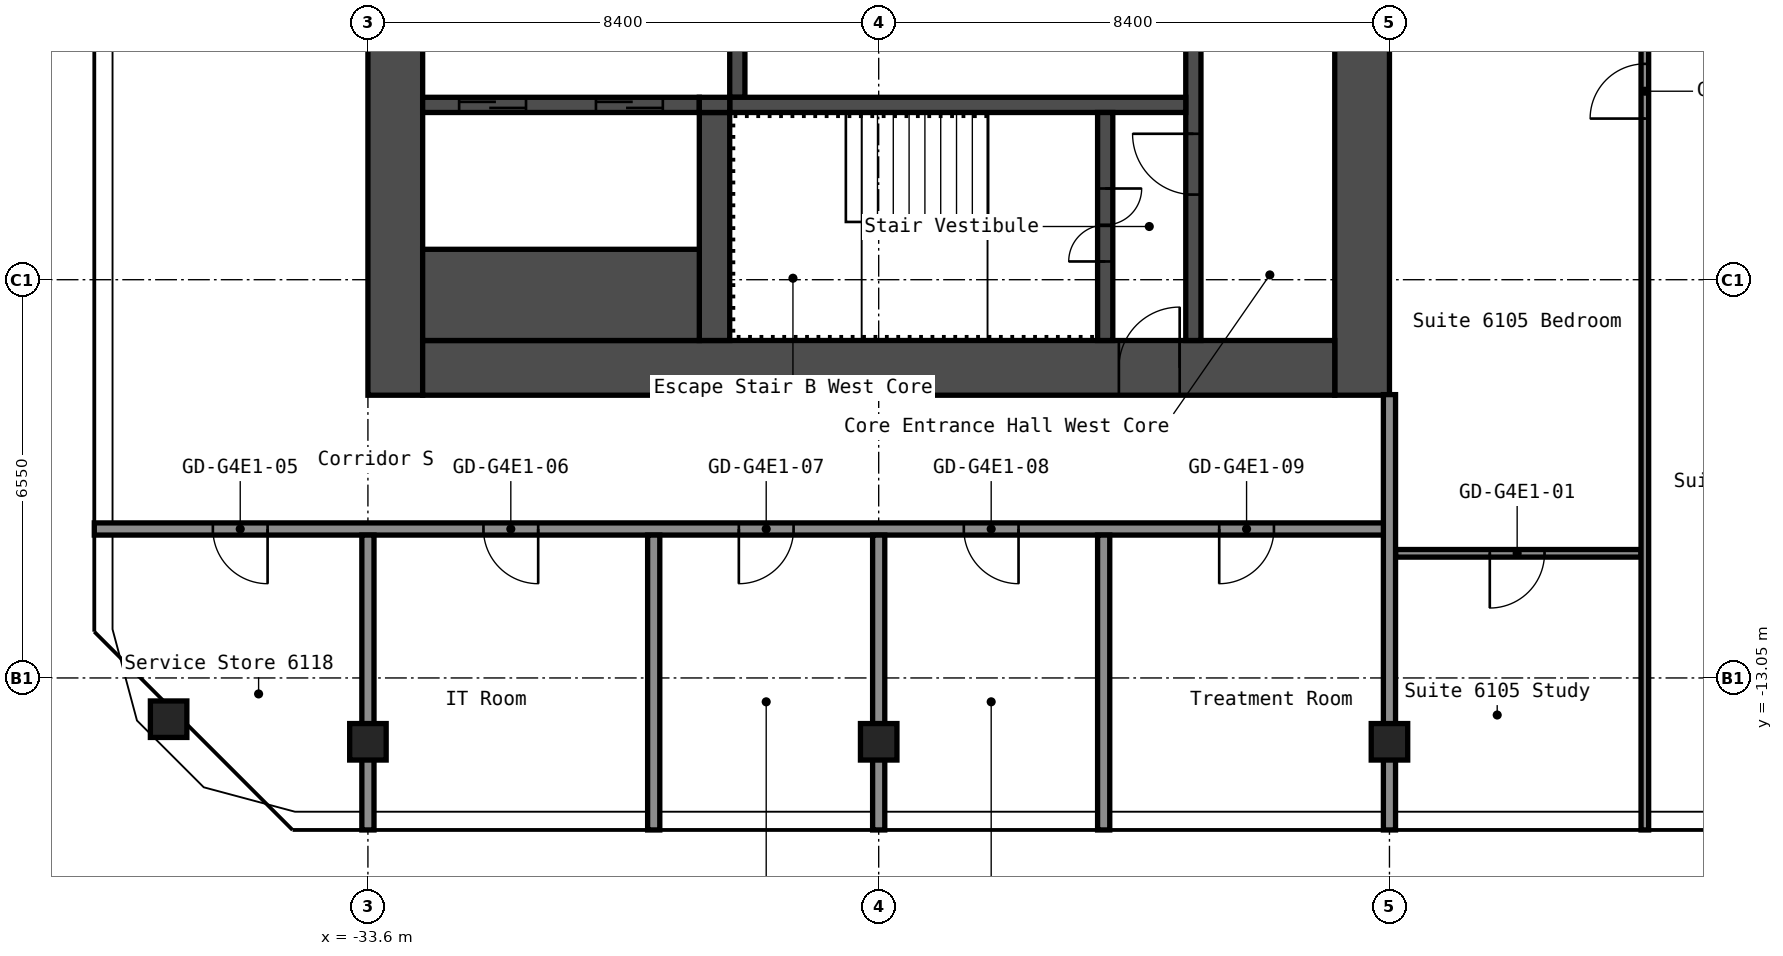
"""IFC4 building model, lengths in metres.
Left out: names, types, materials, properties, quantities, classifications, styles, units other than length and angle.
Written with IfcOpenShell. Run it as: python <this file> out.ifc"""

import sys

from ifc_helpers import new_model, si_unit, direction, frame, frame_2d, origin, origin_2d, place, context, subcontext, project, spatial, rectangle, hollow_rectangle, extrude, element, fill, save


model = new_model("IFC4")
c1 = context("Model", 3, precision=1e-05, world=origin(), true_north=direction((0.0, 1.0)))
c2 = subcontext(c1, "Body", "Model", "MODEL_VIEW")
j1 = project(units=[si_unit("LENGTHUNIT", "METRE"), si_unit("PLANEANGLEUNIT", "RADIAN")], contexts=[c1])
p1 = place(None, origin())
s1 = spatial("IfcSite", under=j1, at=p1, CompositionType="ELEMENT")
p2 = place(p1, origin())
s2 = spatial("IfcBuilding", under=s1, at=p2, CompositionType="ELEMENT")
p3 = place(p2, frame((0.0, 0.0, 215.4)))
s3 = spatial("IfcBuildingStorey", under=s2, at=p3, CompositionType="ELEMENT", Elevation=215.4)
for number, where, z_axis, x_axis in (
    (1, (-36.878, -13.729, 0.0), (0.0, 0.0, 1.0), (1.0, 0.0, 0.0)),
    (2, (-33.6, -14.1, 0.0), (0.0, 0.0, 1.0), (1.0, 0.0, 0.0)),
    (3, (-25.2, -14.1, 0.0), (0.0, 0.0, 1.0), (1.0, 0.0, 0.0)),
    (4, (-16.8, -14.1, 0.0), (0.0, 0.0, 1.0), (1.0, 0.0, 0.0)),
):
    element("IfcColumn", number, at=place(p3, frame(where, z_axis=z_axis, x_axis=x_axis)), inside=s3, PredefinedType="COLUMN", context=c2, shape_type="SweptSolid", body=[
        extrude(hollow_rectangle(XDim=0.6, YDim=0.6, WallThickness=0.025, InnerFilletRadius=0.038, OuterFilletRadius=0.062, at=origin_2d()), origin(), (0.0, 0.0, 1.0), 2.75),
    ])
p4 = place(p3, frame((-17.25, -8.4, 0.0), z_axis=(0.0, 0.0, 1.0), x_axis=(0.0, 1.0, 0.0)))
e5 = element("IfcWall", 5, at=p4, inside=s3, PredefinedType="SHEAR", context=c2, shape_type="SweptSolid", body=[
    extrude(rectangle(XDim=16.8, YDim=0.9, at=frame_2d((8.4, 0.0))), origin(), (0.0, 0.0, 1.0), 2.75),
])
p5 = place(p4, frame((10.1, 0.0, 0.0)))
e6 = element("IfcOpeningElement", 6, at=p5, cuts=e5, PredefinedType="OPENING", context=c2, shape_type="SweptSolid", body=[
    extrude(rectangle(XDim=1.6, YDim=2.1, at=frame_2d((0.8, 1.05))), frame((0.0, 0.46, 0.0), z_axis=(0.0, -1.0, 0.0), x_axis=(1.0, 0.0, 0.0)), (0.0, 0.0, 1.0), 0.92),
])
p6 = place(p3, frame((-33.15, -8.4, 0.0), z_axis=(0.0, 0.0, 1.0), x_axis=(0.0, 1.0, 0.0)))
e7 = element("IfcWall", 7, at=p6, inside=s3, PredefinedType="SHEAR", context=c2, shape_type="SweptSolid", body=[
    extrude(rectangle(XDim=16.8, YDim=0.9, at=frame_2d((8.4, 0.0))), origin(), (0.0, 0.0, 1.0), 2.75),
])
p7 = place(p3, frame((-32.7, -7.95, 0.0), z_axis=(0.0, 0.0, 1.0), x_axis=(1.0, 0.0, 0.0)))
e8 = element("IfcWall", 8, at=p7, inside=s3, PredefinedType="SHEAR", context=c2, shape_type="SweptSolid", body=[
    extrude(rectangle(XDim=15.0, YDim=0.9, at=frame_2d((7.5, 0.0))), origin(), (0.0, 0.0, 1.0), 2.75),
])
p8 = place(p7, frame((11.45, 0.0, 0.0)))
e9 = element("IfcOpeningElement", 9, at=p8, cuts=e8, PredefinedType="OPENING", context=c2, shape_type="SweptSolid", body=[
    extrude(rectangle(XDim=1.0, YDim=2.1, at=frame_2d((0.5, 1.05))), frame((0.0, 0.46, 0.0), z_axis=(0.0, -1.0, 0.0), x_axis=(1.0, 0.0, 0.0)), (0.0, 0.0, 1.0), 0.92),
])
p9 = place(p3, frame((-20.025, -7.5, 0.0), z_axis=(0.0, 0.0, 1.0), x_axis=(0.0, 1.0, 0.0)))
e10 = element("IfcWall", 10, at=p9, inside=s3, PredefinedType="SHEAR", context=c2, shape_type="SweptSolid", body=[
    extrude(rectangle(XDim=6.3, YDim=0.25, at=frame_2d((3.15, 0.0))), origin(), (0.0, 0.0, 1.0), 2.75),
])
p10 = place(p9, frame((2.4, 0.0, 0.0)))
e11 = element("IfcOpeningElement", 11, at=p10, cuts=e10, PredefinedType="OPENING", context=c2, shape_type="SweptSolid", body=[
    extrude(rectangle(XDim=1.0, YDim=2.1, at=frame_2d((0.5, 1.05))), frame((0.0, 0.135, 0.0), z_axis=(0.0, -1.0, 0.0), x_axis=(1.0, 0.0, 0.0)), (0.0, 0.0, 1.0), 0.27),
])
p11 = place(p3, frame((-27.525, -3.5, 0.0), z_axis=(0.0, 0.0, 1.0), x_axis=(0.0, 1.0, 0.0)))
e12 = element("IfcWall", 12, at=p11, inside=s3, PredefinedType="SHEAR", context=c2, shape_type="SweptSolid", body=[
    extrude(rectangle(XDim=2.05, YDim=0.25, at=frame_2d((1.025, 0.0))), origin(), (0.0, 0.0, 1.0), 2.75),
])
p12 = place(p3, frame((-27.65, -3.625, 0.0), z_axis=(0.0, 0.0, 1.0), x_axis=(1.0, 0.0, 0.0)))
e13 = element("IfcWall", 13, at=p12, inside=s3, PredefinedType="SHEAR", context=c2, shape_type="SweptSolid", body=[
    extrude(rectangle(XDim=7.5, YDim=0.25, at=frame_2d((3.75, 0.0))), origin(), (0.0, 0.0, 1.0), 2.75),
])
p13 = place(p3, frame((-21.475, -7.5, 0.0), z_axis=(0.0, 0.0, 1.0), x_axis=(0.0, 1.0, 0.0)))
e14 = element("IfcWall", 14, at=p13, inside=s3, PredefinedType="SHEAR", context=c2, shape_type="SweptSolid", body=[
    extrude(rectangle(XDim=3.75, YDim=0.25, at=frame_2d((1.875, 0.0))), origin(), (0.0, 0.0, 1.0), 2.75),
])
p14 = place(p13, frame((1.3, 0.0, 0.0)))
e15 = element("IfcOpeningElement", 15, at=p14, cuts=e14, PredefinedType="OPENING", context=c2, shape_type="SweptSolid", body=[
    extrude(rectangle(XDim=1.2, YDim=2.1, at=frame_2d((0.6, 1.05))), frame((0.0, 0.135, 0.0), z_axis=(0.0, -1.0, 0.0), x_axis=(1.0, 0.0, 0.0)), (0.0, 0.0, 1.0), 0.27),
])
p15 = place(p3, frame((-27.9, -7.5, 0.0), z_axis=(0.0, 0.0, 1.0), x_axis=(0.0, 1.0, 0.0)))
e16 = element("IfcWall", 16, at=p15, inside=s3, PredefinedType="SHEAR", context=c2, shape_type="SweptSolid", body=[
    extrude(rectangle(XDim=3.75, YDim=0.5, at=frame_2d((1.875, 0.0))), origin(), (0.0, 0.0, 1.0), 2.75),
])
p16 = place(p3, frame((-32.7, -3.625, 0.0), z_axis=(0.0, 0.0, 1.0), x_axis=(1.0, 0.0, 0.0)))
e17 = element("IfcWall", 17, at=p16, inside=s3, PredefinedType="SHEAR", context=c2, shape_type="SweptSolid", body=[
    extrude(rectangle(XDim=4.55, YDim=0.25, at=frame_2d((2.275, 0.0))), origin(), (0.0, 0.0, 1.0), 2.75),
])
p17 = place(p16, frame((2.85, 0.0, 0.0)))
e18 = element("IfcOpeningElement", 18, at=p17, cuts=e17, PredefinedType="OPENING", context=c2, shape_type="SweptSolid", body=[
    extrude(rectangle(XDim=1.1, YDim=2.1, at=frame_2d((0.55, 1.05))), frame((0.0, 0.135, 0.0), z_axis=(0.0, -1.0, 0.0), x_axis=(1.0, 0.0, 0.0)), (0.0, 0.0, 1.0), 0.27),
])
p18 = place(p16, frame((0.6, 0.0, 0.0)))
e19 = element("IfcOpeningElement", 19, at=p18, cuts=e17, PredefinedType="OPENING", context=c2, shape_type="SweptSolid", body=[
    extrude(rectangle(XDim=1.1, YDim=2.1, at=frame_2d((0.55, 1.05))), frame((0.0, 0.135, 0.0), z_axis=(0.0, -1.0, 0.0), x_axis=(1.0, 0.0, 0.0)), (0.0, 0.0, 1.0), 0.27),
])
p19 = place(p3, frame((-32.7, -6.75, 0.0), z_axis=(0.0, 0.0, 1.0), x_axis=(1.0, 0.0, 0.0)))
e20 = element("IfcWall", 20, at=p19, inside=s3, PredefinedType="SHEAR", context=c2, shape_type="SweptSolid", body=[
    extrude(rectangle(XDim=4.55, YDim=1.5, at=frame_2d((2.275, 0.0))), origin(), (0.0, 0.0, 1.0), 2.75),
])
p20 = place(p3, frame((-28.15, -3.625, 0.0), z_axis=(0.0, 0.0, 1.0), x_axis=(1.0, 0.0, 0.0)))
e21 = element("IfcWall", 21, at=p20, inside=s3, PredefinedType="SHEAR", context=c2, shape_type="SweptSolid", body=[
    extrude(rectangle(XDim=0.5, YDim=0.25, at=frame_2d((0.25, 0.0))), origin(), (0.0, 0.0, 1.0), 2.75),
])
p21 = place(p3, frame((-16.7, -11.0, 0.0), z_axis=(0.0, 0.0, 1.0), x_axis=(1.0, 0.0, 0.0)))
e22 = element("IfcWall", 22, at=p21, inside=s3, PredefinedType="PARTITIONING", context=c2, shape_type="SweptSolid", body=[
    extrude(rectangle(XDim=4.037, YDim=0.125, at=frame_2d((2.019, 0.0))), origin(), (0.0, 0.0, 1.0), 2.75),
])
p22 = place(p21, frame((1.55, 0.0, 0.0)))
e23 = element("IfcOpeningElement", 23, at=p22, cuts=e22, PredefinedType="OPENING", context=c2, shape_type="SweptSolid", body=[
    extrude(rectangle(XDim=0.9, YDim=2.1, at=frame_2d((0.45, 1.05))), frame((0.0, 0.073, 0.0), z_axis=(0.0, -1.0, 0.0), x_axis=(1.0, 0.0, 0.0)), (0.0, 0.0, 1.0), 0.145),
])
p23 = place(p3, frame((-38.1, -10.6, 0.0), z_axis=(0.0, 0.0, 1.0), x_axis=(1.0, 0.0, 0.0)))
e24 = element("IfcWall", 24, at=p23, inside=s3, PredefinedType="PARTITIONING", context=c2, shape_type="SweptSolid", body=[
    extrude(rectangle(XDim=21.3, YDim=0.2, at=frame_2d((10.65, 0.0))), origin(), (0.0, 0.0, 1.0), 2.75),
])
p24 = place(p23, frame((1.95, 0.0, 0.0)))
e25 = element("IfcOpeningElement", 25, at=p24, cuts=e24, PredefinedType="OPENING", context=c2, shape_type="SweptSolid", body=[
    extrude(rectangle(XDim=0.9, YDim=2.1, at=frame_2d((0.45, 1.05))), frame((0.0, 0.11, 0.0), z_axis=(0.0, -1.0, 0.0), x_axis=(1.0, 0.0, 0.0)), (0.0, 0.0, 1.0), 0.22),
])
p25 = place(p23, frame((6.4, 0.0, 0.0)))
e26 = element("IfcOpeningElement", 26, at=p25, cuts=e24, PredefinedType="OPENING", context=c2, shape_type="SweptSolid", body=[
    extrude(rectangle(XDim=0.9, YDim=2.1, at=frame_2d((0.45, 1.05))), frame((0.0, 0.11, 0.0), z_axis=(0.0, -1.0, 0.0), x_axis=(1.0, 0.0, 0.0)), (0.0, 0.0, 1.0), 0.22),
])
p26 = place(p23, frame((10.6, 0.0, 0.0)))
e27 = element("IfcOpeningElement", 27, at=p26, cuts=e24, PredefinedType="OPENING", context=c2, shape_type="SweptSolid", body=[
    extrude(rectangle(XDim=0.9, YDim=2.1, at=frame_2d((0.45, 1.05))), frame((0.0, 0.11, 0.0), z_axis=(0.0, -1.0, 0.0), x_axis=(1.0, 0.0, 0.0)), (0.0, 0.0, 1.0), 0.22),
])
p27 = place(p23, frame((14.3, 0.0, 0.0)))
e28 = element("IfcOpeningElement", 28, at=p27, cuts=e24, PredefinedType="OPENING", context=c2, shape_type="SweptSolid", body=[
    extrude(rectangle(XDim=0.9, YDim=2.1, at=frame_2d((0.45, 1.05))), frame((0.0, 0.11, 0.0), z_axis=(0.0, -1.0, 0.0), x_axis=(1.0, 0.0, 0.0)), (0.0, 0.0, 1.0), 0.22),
])
p28 = place(p23, frame((18.5, 0.0, 0.0)))
e29 = element("IfcOpeningElement", 29, at=p28, cuts=e24, PredefinedType="OPENING", context=c2, shape_type="SweptSolid", body=[
    extrude(rectangle(XDim=0.9, YDim=2.1, at=frame_2d((0.45, 1.05))), frame((0.0, 0.11, 0.0), z_axis=(0.0, -1.0, 0.0), x_axis=(1.0, 0.0, 0.0)), (0.0, 0.0, 1.0), 0.22),
])
for number, where, z_axis, x_axis in (
    (30, (-33.6, -15.55, 0.0), (0.0, 0.0, 1.0), (0.0, 1.0, 0.0)),
    (31, (-28.9, -15.55, 0.0), (0.0, 0.0, 1.0), (0.0, 1.0, 0.0)),
    (32, (-25.2, -15.55, 0.0), (0.0, 0.0, 1.0), (0.0, 1.0, 0.0)),
    (33, (-21.5, -15.55, 0.0), (0.0, 0.0, 1.0), (0.0, 1.0, 0.0)),
):
    element("IfcWall", number, at=place(p3, frame(where, z_axis=z_axis, x_axis=x_axis)), inside=s3, PredefinedType="PARTITIONING", context=c2, shape_type="SweptSolid", body=[
        extrude(rectangle(XDim=4.85, YDim=0.2, at=frame_2d((2.425, 0.0))), origin(), (0.0, 0.0, 1.0), 2.75),
    ])
p29 = place(p3, frame((-16.8, -15.55, 0.0), z_axis=(0.0, 0.0, 1.0), x_axis=(0.0, 1.0, 0.0)))
e34 = element("IfcWall", 34, at=p29, inside=s3, PredefinedType="PARTITIONING", context=c2, shape_type="SweptSolid", body=[
    extrude(rectangle(XDim=7.16, YDim=0.2, at=frame_2d((3.58, 0.0))), origin(), (0.0, 0.0, 1.0), 2.75),
])
p30 = place(p3, frame((-12.6, -15.55, 0.0), z_axis=(0.0, 0.0, 1.0), x_axis=(0.0, 1.0, 0.0)))
e35 = element("IfcWall", 35, at=p30, inside=s3, PredefinedType="PARTITIONING", context=c2, shape_type="SweptSolid", body=[
    extrude(rectangle(XDim=16.65, YDim=0.125, at=frame_2d((8.325, 0.0))), origin(), (0.0, 0.0, 1.0), 2.75),
])
p31 = place(p30, frame((11.7, 0.0, 0.0)))
e36 = element("IfcOpeningElement", 36, at=p31, cuts=e35, PredefinedType="OPENING", context=c2, shape_type="SweptSolid", body=[
    extrude(rectangle(XDim=0.9, YDim=2.1, at=frame_2d((0.45, 1.05))), frame((0.0, 0.073, 0.0), z_axis=(0.0, -1.0, 0.0), x_axis=(1.0, 0.0, 0.0)), (0.0, 0.0, 1.0), 0.145),
])
p32 = place(p8, origin())
e37 = element("IfcDoor", 37, at=p32, inside=s3, OperationType="SINGLE_SWING_LEFT", PredefinedType="DOOR", context=c2, shape_type="SweptSolid", body=[
    extrude(rectangle(XDim=1.0, YDim=2.1, at=frame_2d((0.5, 1.05))), frame((0.0, 0.025, 0.0), z_axis=(0.0, -1.0, 0.0), x_axis=(1.0, 0.0, 0.0)), (0.0, 0.0, 1.0), 0.05),
])
fill(e9, e37)
p33 = place(p14, origin())
e38 = element("IfcDoor", 38, at=p33, inside=s3, OperationType="DOUBLE_DOOR_SINGLE_SWING", PredefinedType="DOOR", context=c2, shape_type="SweptSolid", body=[
    extrude(rectangle(XDim=1.2, YDim=2.1, at=frame_2d((0.6, 1.05))), frame((0.0, 0.025, 0.0), z_axis=(0.0, -1.0, 0.0), x_axis=(1.0, 0.0, 0.0)), (0.0, 0.0, 1.0), 0.05),
])
fill(e15, e38)
p34 = place(p10, origin())
e39 = element("IfcDoor", 39, at=p34, inside=s3, OperationType="SINGLE_SWING_LEFT", PredefinedType="DOOR", context=c2, shape_type="SweptSolid", body=[
    extrude(rectangle(XDim=1.0, YDim=2.1, at=frame_2d((0.5, 1.05))), frame((0.0, 0.025, 0.0), z_axis=(0.0, -1.0, 0.0), x_axis=(1.0, 0.0, 0.0)), (0.0, 0.0, 1.0), 0.05),
])
fill(e11, e39)
p35 = place(p17, origin())
e40 = element("IfcDoor", 40, at=p35, inside=s3, OperationType="DOUBLE_DOOR_SLIDING", PredefinedType="DOOR", context=c2, shape_type="SweptSolid", body=[
    extrude(rectangle(XDim=1.1, YDim=2.1, at=frame_2d((0.55, 1.05))), frame((0.0, 0.025, 0.0), z_axis=(0.0, -1.0, 0.0), x_axis=(1.0, 0.0, 0.0)), (0.0, 0.0, 1.0), 0.05),
])
fill(e18, e40)
p36 = place(p18, origin())
e41 = element("IfcDoor", 41, at=p36, inside=s3, OperationType="DOUBLE_DOOR_SLIDING", PredefinedType="DOOR", context=c2, shape_type="SweptSolid", body=[
    extrude(rectangle(XDim=1.1, YDim=2.1, at=frame_2d((0.55, 1.05))), frame((0.0, 0.025, 0.0), z_axis=(0.0, -1.0, 0.0), x_axis=(1.0, 0.0, 0.0)), (0.0, 0.0, 1.0), 0.05),
])
fill(e19, e41)
p37 = place(p22, origin())
e42 = element("IfcDoor", 42, at=p37, inside=s3, OperationType="SINGLE_SWING_LEFT", PredefinedType="DOOR", context=c2, shape_type="SweptSolid", body=[
    extrude(rectangle(XDim=0.9, YDim=2.1, at=frame_2d((0.45, 1.05))), frame((0.0, 0.025, 0.0), z_axis=(0.0, -1.0, 0.0), x_axis=(1.0, 0.0, 0.0)), (0.0, 0.0, 1.0), 0.05),
])
fill(e23, e42)
p38 = place(p24, origin())
e43 = element("IfcDoor", 43, at=p38, inside=s3, OperationType="SINGLE_SWING_RIGHT", PredefinedType="DOOR", context=c2, shape_type="SweptSolid", body=[
    extrude(rectangle(XDim=0.9, YDim=2.1, at=frame_2d((0.45, 1.05))), frame((0.0, 0.025, 0.0), z_axis=(0.0, -1.0, 0.0), x_axis=(1.0, 0.0, 0.0)), (0.0, 0.0, 1.0), 0.05),
])
fill(e25, e43)
p39 = place(p25, origin())
e44 = element("IfcDoor", 44, at=p39, inside=s3, OperationType="SINGLE_SWING_RIGHT", PredefinedType="DOOR", context=c2, shape_type="SweptSolid", body=[
    extrude(rectangle(XDim=0.9, YDim=2.1, at=frame_2d((0.45, 1.05))), frame((0.0, 0.025, 0.0), z_axis=(0.0, -1.0, 0.0), x_axis=(1.0, 0.0, 0.0)), (0.0, 0.0, 1.0), 0.05),
])
fill(e26, e44)
p40 = place(p26, origin())
e45 = element("IfcDoor", 45, at=p40, inside=s3, OperationType="SINGLE_SWING_LEFT", PredefinedType="DOOR", context=c2, shape_type="SweptSolid", body=[
    extrude(rectangle(XDim=0.9, YDim=2.1, at=frame_2d((0.45, 1.05))), frame((0.0, 0.025, 0.0), z_axis=(0.0, -1.0, 0.0), x_axis=(1.0, 0.0, 0.0)), (0.0, 0.0, 1.0), 0.05),
])
fill(e27, e45)
p41 = place(p27, origin())
e46 = element("IfcDoor", 46, at=p41, inside=s3, OperationType="SINGLE_SWING_RIGHT", PredefinedType="DOOR", context=c2, shape_type="SweptSolid", body=[
    extrude(rectangle(XDim=0.9, YDim=2.1, at=frame_2d((0.45, 1.05))), frame((0.0, 0.025, 0.0), z_axis=(0.0, -1.0, 0.0), x_axis=(1.0, 0.0, 0.0)), (0.0, 0.0, 1.0), 0.05),
])
fill(e28, e46)
p42 = place(p28, origin())
e47 = element("IfcDoor", 47, at=p42, inside=s3, OperationType="SINGLE_SWING_LEFT", PredefinedType="DOOR", context=c2, shape_type="SweptSolid", body=[
    extrude(rectangle(XDim=0.9, YDim=2.1, at=frame_2d((0.45, 1.05))), frame((0.0, 0.025, 0.0), z_axis=(0.0, -1.0, 0.0), x_axis=(1.0, 0.0, 0.0)), (0.0, 0.0, 1.0), 0.05),
])
fill(e29, e47)
p43 = place(p31, origin())
e48 = element("IfcDoor", 48, at=p43, inside=s3, OperationType="SINGLE_SWING_RIGHT", PredefinedType="DOOR", context=c2, shape_type="SweptSolid", body=[
    extrude(rectangle(XDim=0.9, YDim=2.1, at=frame_2d((0.45, 1.05))), frame((0.0, 0.025, 0.0), z_axis=(0.0, -1.0, 0.0), x_axis=(1.0, 0.0, 0.0)), (0.0, 0.0, 1.0), 0.05),
])
fill(e36, e48)
save(model, sys.argv[1])
